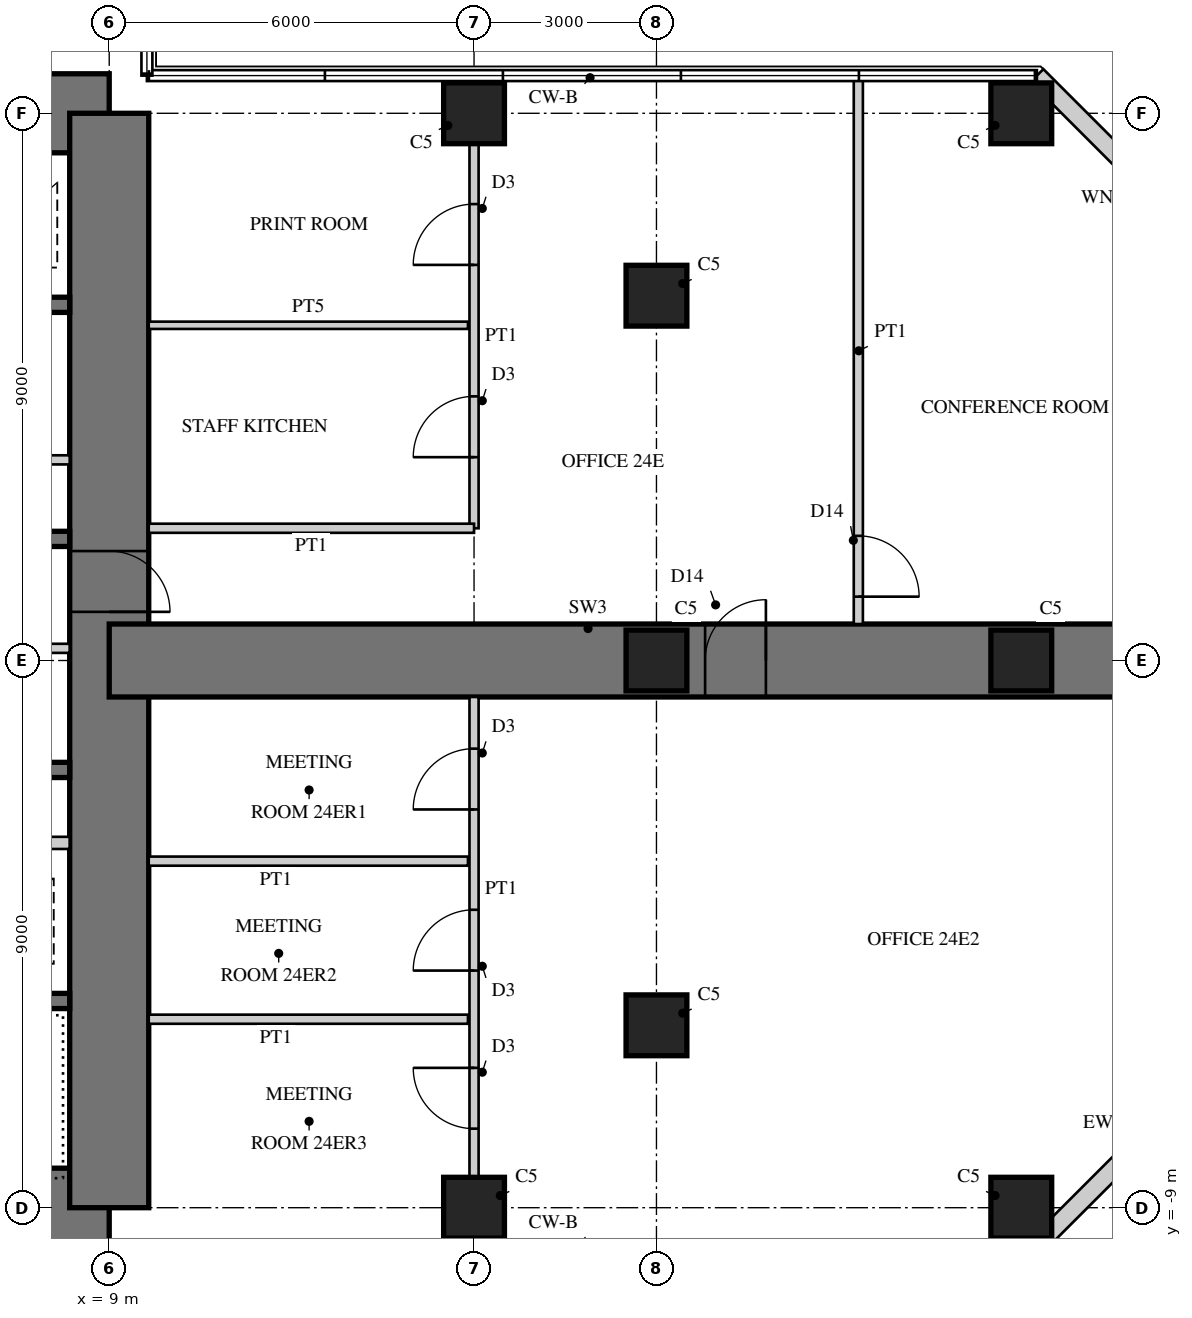
"""IFC4 building model, lengths in metres.
Left out: names, types, materials, properties, quantities, classifications, styles, units other than length and angle.
Written with IfcOpenShell. Run it as: python <this file> out.ifc"""

import sys

from ifc_helpers import new_model, si_unit, direction, frame, frame_2d, origin, origin_2d, place, context, subcontext, project, spatial, rectangle, extrude, element, fill, save


model = new_model("IFC4")
c1 = context("Model", 3, precision=1e-05, world=origin(), true_north=direction((0.0, 1.0)))
c2 = subcontext(c1, "Body", "Model", "MODEL_VIEW")
j1 = project(units=[si_unit("LENGTHUNIT", "METRE"), si_unit("PLANEANGLEUNIT", "RADIAN")], contexts=[c1])
p1 = place(None, origin())
s1 = spatial("IfcSite", under=j1, at=p1, CompositionType="ELEMENT")
p2 = place(p1, origin())
s2 = spatial("IfcBuilding", under=s1, at=p2, CompositionType="ELEMENT")
p3 = place(p2, frame((0.0, 0.0, 100.5)))
s3 = spatial("IfcBuildingStorey", under=s2, at=p3, CompositionType="ELEMENT", Elevation=100.5)
p4 = place(p3, frame((9.0, 9.0, 0.0), z_axis=(0.0, 0.0, 1.0), x_axis=(-1.0, 0.0, 0.0)))
e1 = element("IfcWall", 1, at=p4, inside=s3, PredefinedType="SHEAR", context=c2, shape_type="SweptSolid", body=[
    extrude(rectangle(XDim=18.0, YDim=1.3, at=frame_2d((9.0, 0.0))), origin(), (0.0, 0.0, 1.0), 4.0),
])
p5 = place(p4, frame((9.8, 0.0, 0.0)))
e2 = element("IfcOpeningElement", 2, at=p5, cuts=e1, PredefinedType="OPENING", context=c2, shape_type="SweptSolid", body=[
    extrude(rectangle(XDim=1.0, YDim=2.4, at=frame_2d((0.5, 1.2))), frame((0.0, 0.66, 0.0), z_axis=(0.0, -1.0, 0.0), x_axis=(1.0, 0.0, 0.0)), (0.0, 0.0, 1.0), 1.32),
])
p6 = place(p3, frame((-9.0, -9.0, 0.0), z_axis=(0.0, 0.0, 1.0), x_axis=(1.0, 0.0, 0.0)))
e3 = element("IfcWall", 3, at=p6, inside=s3, PredefinedType="SHEAR", context=c2, shape_type="SweptSolid", body=[
    extrude(rectangle(XDim=18.0, YDim=1.3, at=frame_2d((9.0, 0.0))), origin(), (0.0, 0.0, 1.0), 4.0),
])
p7 = place(p6, frame((9.8, 0.0, 0.0)))
e4 = element("IfcOpeningElement", 4, at=p7, cuts=e3, PredefinedType="OPENING", context=c2, shape_type="SweptSolid", body=[
    extrude(rectangle(XDim=1.0, YDim=2.4, at=frame_2d((0.5, 1.2))), frame((0.0, 0.66, 0.0), z_axis=(0.0, -1.0, 0.0), x_axis=(1.0, 0.0, 0.0)), (0.0, 0.0, 1.0), 1.32),
])
p8 = place(p3, frame((9.0, -9.0, 0.0), z_axis=(0.0, 0.0, 1.0), x_axis=(0.0, 1.0, 0.0)))
e5 = element("IfcWall", 5, at=p8, inside=s3, PredefinedType="SHEAR", context=c2, shape_type="SweptSolid", body=[
    extrude(rectangle(XDim=18.0, YDim=1.3, at=frame_2d((9.0, 0.0))), origin(), (0.0, 0.0, 1.0), 4.0),
])
p9 = place(p8, frame((9.8, 0.0, 0.0)))
e6 = element("IfcOpeningElement", 6, at=p9, cuts=e5, PredefinedType="OPENING", context=c2, shape_type="SweptSolid", body=[
    extrude(rectangle(XDim=1.0, YDim=2.4, at=frame_2d((0.5, 1.2))), frame((0.0, 0.66, 0.0), z_axis=(0.0, -1.0, 0.0), x_axis=(1.0, 0.0, 0.0)), (0.0, 0.0, 1.0), 1.32),
])
p10 = place(p3, frame((1.925, 2.0, 0.0), z_axis=(0.0, 0.0, 1.0), x_axis=(1.0, 0.0, 0.0)))
e7 = element("IfcWall", 7, at=p10, inside=s3, PredefinedType="SHEAR", context=c2, shape_type="SweptSolid", body=[
    extrude(rectangle(XDim=6.425, YDim=0.25, at=frame_2d((3.212, 0.0))), origin(), (0.0, 0.0, 1.0), 4.0),
])
p11 = place(p3, frame((1.925, 5.85, 0.0), z_axis=(0.0, 0.0, 1.0), x_axis=(1.0, 0.0, 0.0)))
e8 = element("IfcWall", 8, at=p11, inside=s3, PredefinedType="SHEAR", context=c2, shape_type="SweptSolid", body=[
    extrude(rectangle(XDim=6.425, YDim=0.25, at=frame_2d((3.212, 0.0))), origin(), (0.0, 0.0, 1.0), 4.0),
])
p12 = place(p11, frame((0.454, 0.0, 0.0)))
e9 = element("IfcOpeningElement", 9, at=p12, cuts=e8, PredefinedType="OPENING", context=c2, shape_type="SweptSolid", body=[
    extrude(rectangle(XDim=1.1, YDim=2.2, at=frame_2d((0.55, 1.1))), frame((0.0, 0.135, 0.0), z_axis=(0.0, -1.0, 0.0), x_axis=(1.0, 0.0, 0.0)), (0.0, 0.0, 1.0), 0.27),
])
p13 = place(p11, frame((2.663, 0.0, 0.0)))
e10 = element("IfcOpeningElement", 10, at=p13, cuts=e8, PredefinedType="OPENING", context=c2, shape_type="SweptSolid", body=[
    extrude(rectangle(XDim=1.1, YDim=2.2, at=frame_2d((0.55, 1.1))), frame((0.0, 0.135, 0.0), z_axis=(0.0, -1.0, 0.0), x_axis=(1.0, 0.0, 0.0)), (0.0, 0.0, 1.0), 0.27),
])
p14 = place(p11, frame((4.871, 0.0, 0.0)))
e11 = element("IfcOpeningElement", 11, at=p14, cuts=e8, PredefinedType="OPENING", context=c2, shape_type="SweptSolid", body=[
    extrude(rectangle(XDim=1.1, YDim=2.2, at=frame_2d((0.55, 1.1))), frame((0.0, 0.135, 0.0), z_axis=(0.0, -1.0, 0.0), x_axis=(1.0, 0.0, 0.0)), (0.0, 0.0, 1.0), 0.27),
])
p15 = place(p3, frame((1.925, 3.3, 0.0), z_axis=(0.0, 0.0, 1.0), x_axis=(1.0, 0.0, 0.0)))
e12 = element("IfcWall", 12, at=p15, inside=s3, PredefinedType="PARTITIONING", context=c2, shape_type="SweptSolid", body=[
    extrude(rectangle(XDim=6.425, YDim=0.15, at=frame_2d((3.212, 0.0))), origin(), (0.0, 0.0, 1.0), 4.0),
])
p16 = place(p15, frame((0.075, 0.0, 0.0)))
e13 = element("IfcOpeningElement", 13, at=p16, cuts=e12, PredefinedType="OPENING", context=c2, shape_type="SweptSolid", body=[
    extrude(rectangle(XDim=0.8, YDim=2.1, at=frame_2d((0.4, 1.05))), frame((0.0, 0.085, 0.0), z_axis=(0.0, -1.0, 0.0), x_axis=(1.0, 0.0, 0.0)), (0.0, 0.0, 1.0), 0.17),
])
p17 = place(p15, frame((3.675, 0.0, 0.0)))
e14 = element("IfcOpeningElement", 14, at=p17, cuts=e12, PredefinedType="OPENING", context=c2, shape_type="SweptSolid", body=[
    extrude(rectangle(XDim=0.8, YDim=2.1, at=frame_2d((0.4, 1.05))), frame((0.0, 0.085, 0.0), z_axis=(0.0, -1.0, 0.0), x_axis=(1.0, 0.0, 0.0)), (0.0, 0.0, 1.0), 0.17),
])
p18 = place(p3, frame((2.125, -1.8, 0.0), z_axis=(0.0, 0.0, 1.0), x_axis=(1.0, 0.0, 0.0)))
e15 = element("IfcWall", 15, at=p18, inside=s3, PredefinedType="SHEAR", context=c2, shape_type="SweptSolid", body=[
    extrude(rectangle(XDim=6.225, YDim=0.25, at=frame_2d((3.113, 0.0))), origin(), (0.0, 0.0, 1.0), 4.0),
])
p19 = place(p3, frame((2.125, -5.6, 0.0), z_axis=(0.0, 0.0, 1.0), x_axis=(1.0, 0.0, 0.0)))
e16 = element("IfcWall", 16, at=p19, inside=s3, PredefinedType="SHEAR", context=c2, shape_type="SweptSolid", body=[
    extrude(rectangle(XDim=6.225, YDim=0.25, at=frame_2d((3.113, 0.0))), origin(), (0.0, 0.0, 1.0), 4.0),
])
p20 = place(p19, frame((0.175, 0.0, 0.0)))
e17 = element("IfcOpeningElement", 17, at=p20, cuts=e16, PredefinedType="OPENING", context=c2, shape_type="SweptSolid", body=[
    extrude(rectangle(XDim=1.0, YDim=2.1, at=frame_2d((0.5, 1.05))), frame((0.0, 0.135, 0.0), z_axis=(0.0, -1.0, 0.0), x_axis=(1.0, 0.0, 0.0)), (0.0, 0.0, 1.0), 0.27),
])
p21 = place(p3, frame((5.725, -3.0, 0.0), z_axis=(0.0, 0.0, 1.0), x_axis=(1.0, 0.0, 0.0)))
e18 = element("IfcWall", 18, at=p21, inside=s3, PredefinedType="PARTITIONING", context=c2, shape_type="SweptSolid", body=[
    extrude(rectangle(XDim=2.625, YDim=0.2, at=frame_2d((1.312, 0.0))), origin(), (0.0, 0.0, 1.0), 4.0),
])
p22 = place(p3, frame((9.0, 0.0, 0.0), z_axis=(0.0, 0.0, 1.0), x_axis=(1.0, 0.0, 0.0)))
e19 = element("IfcWall", 19, at=p22, inside=s3, PredefinedType="SHEAR", context=c2, shape_type="SweptSolid", body=[
    extrude(rectangle(XDim=18.0, YDim=1.2, at=frame_2d((9.0, 0.0))), origin(), (0.0, 0.0, 1.0), 4.0),
])
p23 = place(p22, frame((9.8, 0.0, 0.0)))
e20 = element("IfcOpeningElement", 20, at=p23, cuts=e19, PredefinedType="OPENING", context=c2, shape_type="SweptSolid", body=[
    extrude(rectangle(XDim=1.0, YDim=2.2, at=frame_2d((0.5, 1.1))), frame((0.0, 0.61, 0.0), z_axis=(0.0, -1.0, 0.0), x_axis=(1.0, 0.0, 0.0)), (0.0, 0.0, 1.0), 1.22),
])
for number, where, z_axis, x_axis in (
    (21, (15.0, -9.0, 0.0), (0.0, 0.0, 1.0), (1.0, 0.0, 0.0)),
    (22, (24.0, -9.0, 0.0), (0.0, 0.0, 1.0), (1.0, 0.0, 0.0)),
    (23, (15.0, 9.0, 0.0), (0.0, 0.0, 1.0), (1.0, 0.0, 0.0)),
    (24, (24.0, 9.0, 0.0), (0.0, 0.0, 1.0), (1.0, 0.0, 0.0)),
    (25, (18.0, -6.0, 0.0), (0.0, 0.0, 1.0), (1.0, 0.0, 0.0)),
    (26, (18.0, 0.0, 0.0), (0.0, 0.0, 1.0), (1.0, 0.0, 0.0)),
    (27, (18.0, 6.0, 0.0), (0.0, 0.0, 1.0), (1.0, 0.0, 0.0)),
    (28, (24.0, 0.0, 0.0), (0.0, 0.0, 1.0), (1.0, 0.0, 0.0)),
):
    element("IfcColumn", number, at=place(p3, frame(where, z_axis=z_axis, x_axis=x_axis)), inside=s3, PredefinedType="COLUMN", context=c2, shape_type="SweptSolid", body=[
        extrude(rectangle(XDim=1.0, YDim=1.0, at=origin_2d()), origin(), (0.0, 0.0, 1.0), 4.0),
    ])
p24 = place(p3, frame((24.257, -9.62, 0.0), z_axis=(0.0, 0.0, 1.0), x_axis=(0.707106781187, 0.707106781187, 0.0)))
e29 = element("IfcWall", 29, at=p24, inside=s3, PredefinedType="SOLIDWALL", context=c2, shape_type="SweptSolid", body=[
    extrude(rectangle(XDim=4.728, YDim=0.3, at=frame_2d((2.364, 0.0))), origin(), (0.0, 0.0, 1.0), 3.8),
])
p25 = place(p24, frame((1.914, 0.0, 0.3)))
e30 = element("IfcOpeningElement", 30, at=p25, cuts=e29, PredefinedType="OPENING", context=c2, shape_type="SweptSolid", body=[
    extrude(rectangle(XDim=0.9, YDim=2.4, at=frame_2d((0.45, 1.2))), frame((0.0, 0.16, 0.0), z_axis=(0.0, -1.0, 0.0), x_axis=(1.0, 0.0, 0.0)), (0.0, 0.0, 1.0), 0.32),
])
p26 = place(p3, frame((27.6, 6.277, 0.0), z_axis=(0.0, 0.0, 1.0), x_axis=(-0.707106781187, 0.707106781187, 0.0)))
e31 = element("IfcWall", 31, at=p26, inside=s3, PredefinedType="SOLIDWALL", context=c2, shape_type="SweptSolid", body=[
    extrude(rectangle(XDim=4.728, YDim=0.3, at=frame_2d((2.364, 0.0))), origin(), (0.0, 0.0, 1.0), 3.8),
])
p27 = place(p26, frame((1.914, 0.0, 0.3)))
e32 = element("IfcOpeningElement", 32, at=p27, cuts=e31, PredefinedType="OPENING", context=c2, shape_type="SweptSolid", body=[
    extrude(rectangle(XDim=0.9, YDim=2.4, at=frame_2d((0.45, 1.2))), frame((0.0, 0.16, 0.0), z_axis=(0.0, -1.0, 0.0), x_axis=(1.0, 0.0, 0.0)), (0.0, 0.0, 1.0), 0.32),
])
p28 = place(p3, frame((2.325, 0.2, 0.0), z_axis=(0.0, 0.0, 1.0), x_axis=(1.0, 0.0, 0.0)))
e33 = element("IfcWall", 33, at=p28, inside=s3, PredefinedType="PARTITIONING", context=c2, shape_type="SweptSolid", body=[
    extrude(rectangle(XDim=6.025, YDim=0.15, at=frame_2d((3.013, 0.0))), origin(), (0.0, 0.0, 1.0), 3.8),
])
p29 = place(p28, frame((0.4, 0.0, 0.0)))
e34 = element("IfcOpeningElement", 34, at=p29, cuts=e33, PredefinedType="OPENING", context=c2, shape_type="SweptSolid", body=[
    extrude(rectangle(XDim=1.0, YDim=2.1, at=frame_2d((0.5, 1.05))), frame((0.0, 0.085, 0.0), z_axis=(0.0, -1.0, 0.0), x_axis=(1.0, 0.0, 0.0)), (0.0, 0.0, 1.0), 0.17),
])
p30 = place(p3, frame((15.0, 2.175, 0.0), z_axis=(0.0, 0.0, 1.0), x_axis=(0.0, 1.0, 0.0)))
e35 = element("IfcWall", 35, at=p30, inside=s3, PredefinedType="PARTITIONING", context=c2, shape_type="SweptSolid", body=[
    extrude(rectangle(XDim=6.325, YDim=0.15, at=frame_2d((3.163, 0.0))), origin(), (0.0, 0.0, 1.0), 3.0),
])
p31 = place(p30, frame((1.169, 0.0, 0.0)))
e36 = element("IfcOpeningElement", 36, at=p31, cuts=e35, PredefinedType="OPENING", context=c2, shape_type="SweptSolid", body=[
    extrude(rectangle(XDim=1.0, YDim=2.1, at=frame_2d((0.5, 1.05))), frame((0.0, 0.085, 0.0), z_axis=(0.0, -1.0, 0.0), x_axis=(1.0, 0.0, 0.0)), (0.0, 0.0, 1.0), 0.17),
])
p32 = place(p30, frame((4.332, 0.0, 0.0)))
e37 = element("IfcOpeningElement", 37, at=p32, cuts=e35, PredefinedType="OPENING", context=c2, shape_type="SweptSolid", body=[
    extrude(rectangle(XDim=1.0, YDim=2.1, at=frame_2d((0.5, 1.05))), frame((0.0, 0.085, 0.0), z_axis=(0.0, -1.0, 0.0), x_axis=(1.0, 0.0, 0.0)), (0.0, 0.0, 1.0), 0.17),
])
p33 = place(p3, frame((9.65, 2.175, 0.0), z_axis=(0.0, 0.0, 1.0), x_axis=(1.0, 0.0, 0.0)))
e38 = element("IfcWall", 38, at=p33, inside=s3, PredefinedType="PARTITIONING", context=c2, shape_type="SweptSolid", body=[
    extrude(rectangle(XDim=5.35, YDim=0.15, at=frame_2d((2.675, 0.0))), origin(), (0.0, 0.0, 1.0), 3.8),
])
p34 = place(p3, frame((9.65, 5.513, 0.0), z_axis=(0.0, 0.0, 1.0), x_axis=(1.0, 0.0, 0.0)))
e39 = element("IfcWall", 39, at=p34, inside=s3, PredefinedType="PLUMBINGWALL", context=c2, shape_type="SweptSolid", body=[
    extrude(rectangle(XDim=5.25, YDim=0.12, at=frame_2d((2.625, 0.0))), origin(), (0.0, 0.0, 1.0), 3.8),
])
p35 = place(p3, frame((15.0, -8.5, 0.0), z_axis=(0.0, 0.0, 1.0), x_axis=(0.0, 1.0, 0.0)))
e40 = element("IfcWall", 40, at=p35, inside=s3, PredefinedType="PARTITIONING", context=c2, shape_type="SweptSolid", body=[
    extrude(rectangle(XDim=7.9, YDim=0.15, at=frame_2d((3.95, 0.0))), origin(), (0.0, 0.0, 1.0), 3.0),
])
p36 = place(p35, frame((0.8, 0.0, 0.0)))
e41 = element("IfcOpeningElement", 41, at=p36, cuts=e40, PredefinedType="OPENING", context=c2, shape_type="SweptSolid", body=[
    extrude(rectangle(XDim=1.0, YDim=2.1, at=frame_2d((0.5, 1.05))), frame((0.0, 0.085, 0.0), z_axis=(0.0, -1.0, 0.0), x_axis=(1.0, 0.0, 0.0)), (0.0, 0.0, 1.0), 0.17),
])
p37 = place(p35, frame((3.4, 0.0, 0.0)))
e42 = element("IfcOpeningElement", 42, at=p37, cuts=e40, PredefinedType="OPENING", context=c2, shape_type="SweptSolid", body=[
    extrude(rectangle(XDim=1.0, YDim=2.1, at=frame_2d((0.5, 1.05))), frame((0.0, 0.085, 0.0), z_axis=(0.0, -1.0, 0.0), x_axis=(1.0, 0.0, 0.0)), (0.0, 0.0, 1.0), 0.17),
])
p38 = place(p35, frame((6.05, 0.0, 0.0)))
e43 = element("IfcOpeningElement", 43, at=p38, cuts=e40, PredefinedType="OPENING", context=c2, shape_type="SweptSolid", body=[
    extrude(rectangle(XDim=1.0, YDim=2.1, at=frame_2d((0.5, 1.05))), frame((0.0, 0.085, 0.0), z_axis=(0.0, -1.0, 0.0), x_axis=(1.0, 0.0, 0.0)), (0.0, 0.0, 1.0), 0.17),
])
p39 = place(p3, frame((9.65, -3.3, 0.0), z_axis=(0.0, 0.0, 1.0), x_axis=(1.0, 0.0, 0.0)))
e44 = element("IfcWall", 44, at=p39, inside=s3, PredefinedType="PARTITIONING", context=c2, shape_type="SweptSolid", body=[
    extrude(rectangle(XDim=5.25, YDim=0.15, at=frame_2d((2.625, 0.0))), origin(), (0.0, 0.0, 1.0), 3.8),
])
p40 = place(p3, frame((9.65, -5.9, 0.0), z_axis=(0.0, 0.0, 1.0), x_axis=(1.0, 0.0, 0.0)))
e45 = element("IfcWall", 45, at=p40, inside=s3, PredefinedType="PARTITIONING", context=c2, shape_type="SweptSolid", body=[
    extrude(rectangle(XDim=5.25, YDim=0.15, at=frame_2d((2.625, 0.0))), origin(), (0.0, 0.0, 1.0), 3.1),
])
p41 = place(p3, frame((21.32, 0.6, 0.0), z_axis=(0.0, 0.0, 1.0), x_axis=(0.0, 1.0, 0.0)))
e46 = element("IfcWall", 46, at=p41, inside=s3, PredefinedType="PARTITIONING", context=c2, shape_type="SweptSolid", body=[
    extrude(rectangle(XDim=8.98, YDim=0.15, at=frame_2d((4.49, 0.0))), origin(), (0.0, 0.0, 1.0), 3.8),
])
p42 = place(p41, frame((0.45, 0.0, 0.0)))
e47 = element("IfcOpeningElement", 47, at=p42, cuts=e46, PredefinedType="OPENING", context=c2, shape_type="SweptSolid", body=[
    extrude(rectangle(XDim=1.0, YDim=2.2, at=frame_2d((0.5, 1.1))), frame((0.0, 0.085, 0.0), z_axis=(0.0, -1.0, 0.0), x_axis=(1.0, 0.0, 0.0)), (0.0, 0.0, 1.0), 0.17),
])
p43 = place(p31, origin())
e48 = element("IfcDoor", 48, at=p43, inside=s3, OperationType="SINGLE_SWING_LEFT", PredefinedType="DOOR", context=c2, shape_type="SweptSolid", body=[
    extrude(rectangle(XDim=1.0, YDim=2.1, at=frame_2d((0.5, 1.05))), frame((0.0, 0.025, 0.0), z_axis=(0.0, -1.0, 0.0), x_axis=(1.0, 0.0, 0.0)), (0.0, 0.0, 1.0), 0.05),
])
fill(e36, e48)
p44 = place(p32, origin())
e49 = element("IfcDoor", 49, at=p44, inside=s3, OperationType="SINGLE_SWING_LEFT", PredefinedType="DOOR", context=c2, shape_type="SweptSolid", body=[
    extrude(rectangle(XDim=1.0, YDim=2.1, at=frame_2d((0.5, 1.05))), frame((0.0, 0.025, 0.0), z_axis=(0.0, -1.0, 0.0), x_axis=(1.0, 0.0, 0.0)), (0.0, 0.0, 1.0), 0.05),
])
fill(e37, e49)
p45 = place(p36, origin())
e50 = element("IfcDoor", 50, at=p45, inside=s3, OperationType="SINGLE_SWING_RIGHT", PredefinedType="DOOR", context=c2, shape_type="SweptSolid", body=[
    extrude(rectangle(XDim=1.0, YDim=2.1, at=frame_2d((0.5, 1.05))), frame((0.0, 0.025, 0.0), z_axis=(0.0, -1.0, 0.0), x_axis=(1.0, 0.0, 0.0)), (0.0, 0.0, 1.0), 0.05),
])
fill(e41, e50)
p46 = place(p37, origin())
e51 = element("IfcDoor", 51, at=p46, inside=s3, OperationType="SINGLE_SWING_LEFT", PredefinedType="DOOR", context=c2, shape_type="SweptSolid", body=[
    extrude(rectangle(XDim=1.0, YDim=2.1, at=frame_2d((0.5, 1.05))), frame((0.0, 0.025, 0.0), z_axis=(0.0, -1.0, 0.0), x_axis=(1.0, 0.0, 0.0)), (0.0, 0.0, 1.0), 0.05),
])
fill(e42, e51)
p47 = place(p38, origin())
e52 = element("IfcDoor", 52, at=p47, inside=s3, OperationType="SINGLE_SWING_LEFT", PredefinedType="DOOR", context=c2, shape_type="SweptSolid", body=[
    extrude(rectangle(XDim=1.0, YDim=2.1, at=frame_2d((0.5, 1.05))), frame((0.0, 0.025, 0.0), z_axis=(0.0, -1.0, 0.0), x_axis=(1.0, 0.0, 0.0)), (0.0, 0.0, 1.0), 0.05),
])
fill(e43, e52)
p48 = place(p42, frame((1.0, 0.0, 0.0), z_axis=(0.0, 0.0, 1.0), x_axis=(-1.0, 0.0, 0.0)))
e53 = element("IfcDoor", 53, at=p48, inside=s3, OperationType="SINGLE_SWING_RIGHT", PredefinedType="DOOR", context=c2, shape_type="SweptSolid", body=[
    extrude(rectangle(XDim=1.0, YDim=2.2, at=frame_2d((0.5, 1.1))), frame((0.0, 0.025, 0.0), z_axis=(0.0, -1.0, 0.0), x_axis=(1.0, 0.0, 0.0)), (0.0, 0.0, 1.0), 0.05),
])
fill(e47, e53)
p49 = place(p23, origin())
e54 = element("IfcDoor", 54, at=p49, inside=s3, OperationType="SINGLE_SWING_RIGHT", PredefinedType="DOOR", context=c2, shape_type="SweptSolid", body=[
    extrude(rectangle(XDim=1.0, YDim=2.2, at=frame_2d((0.5, 1.1))), frame((0.0, 0.025, 0.0), z_axis=(0.0, -1.0, 0.0), x_axis=(1.0, 0.0, 0.0)), (0.0, 0.0, 1.0), 0.05),
])
fill(e20, e54)
p50 = place(p9, frame((1.0, 0.0, 0.0), z_axis=(0.0, 0.0, 1.0), x_axis=(-1.0, 0.0, 0.0)))
e55 = element("IfcDoor", 55, at=p50, inside=s3, OperationType="SINGLE_SWING_RIGHT", PredefinedType="DOOR", context=c2, shape_type="SweptSolid", body=[
    extrude(rectangle(XDim=1.0, YDim=2.4, at=frame_2d((0.5, 1.2))), frame((0.0, -0.005, 0.0), z_axis=(0.0, -1.0, 0.0), x_axis=(1.0, 0.0, 0.0)), (0.0, 0.0, 1.0), 0.05),
])
fill(e6, e55)
save(model, sys.argv[1])
